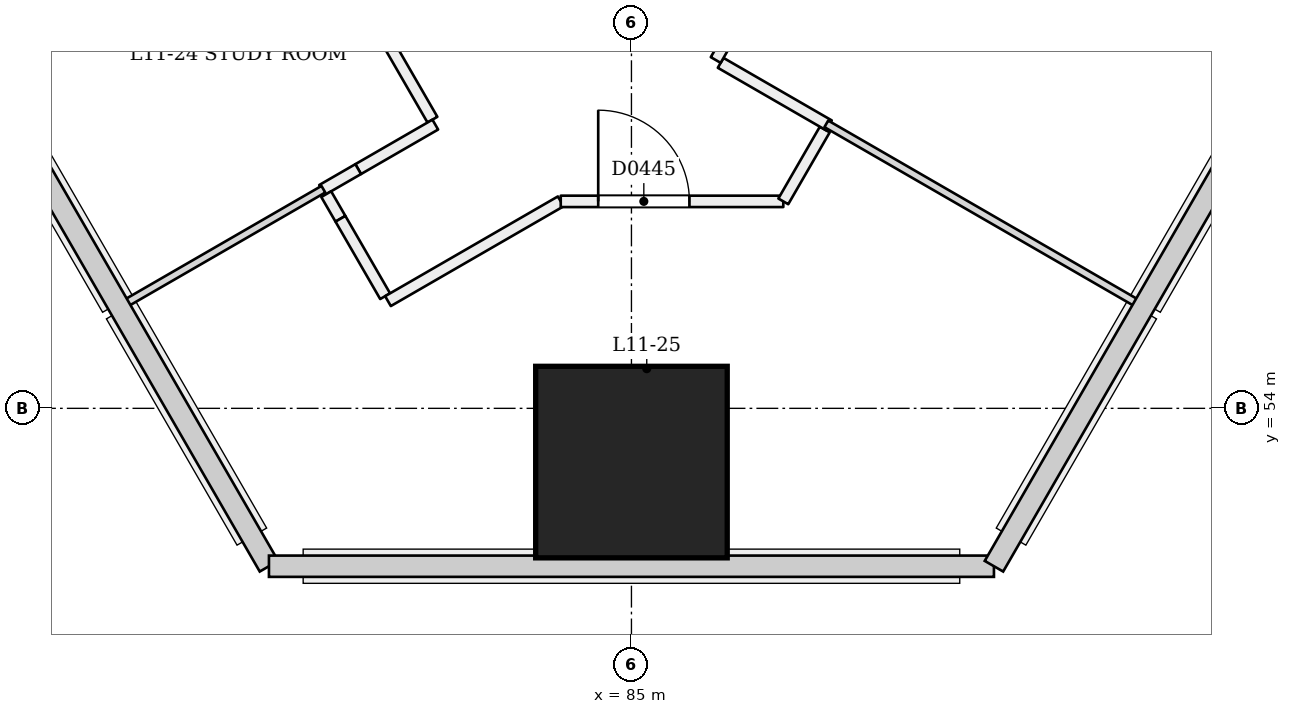
"""IFC4 building model, lengths in metres.
Left out: names, types, materials, properties, quantities, classifications, styles, units other than length and angle.
Written with IfcOpenShell. Run it as: python <this file> out.ifc"""

import sys

from ifc_helpers import new_model, si_unit, direction, frame, frame_2d, origin, origin_2d, place, context, subcontext, project, spatial, rectangle, extrude, element, fill, save


model = new_model("IFC4")
c1 = context("Model", 3, precision=1e-05, world=origin(), true_north=direction((0.0, 1.0)))
c2 = subcontext(c1, "Body", "Model", "MODEL_VIEW")
j1 = project(units=[si_unit("LENGTHUNIT", "METRE"), si_unit("PLANEANGLEUNIT", "RADIAN")], contexts=[c1])
p1 = place(None, origin())
s1 = spatial("IfcSite", under=j1, at=p1, CompositionType="ELEMENT")
p2 = place(p1, origin())
s2 = spatial("IfcBuilding", under=s1, at=p2, CompositionType="ELEMENT")
p3 = place(p2, frame((0.0, 0.0, 48.6)))
s3 = spatial("IfcBuildingStorey", under=s2, at=p3, CompositionType="ELEMENT", Elevation=48.6)
p4 = place(p3, frame((85.0, 53.223, 0.0), z_axis=(0.0, 0.058360852261, 0.998295552892), x_axis=(-1.0, 0.0, 0.0)))
e1 = element("IfcColumn", 1, at=p4, inside=s3, PredefinedType="COLUMN", context=c2, shape_type="SweptSolid", body=[
    extrude(rectangle(XDim=2.52, YDim=2.52, at=origin_2d()), origin(), (0.0, 0.0, 1.0), 3.606),
])
p5 = place(p3, frame((81.788, 58.826, 0.0), z_axis=(0.0, 0.0, 1.0), x_axis=(0.500030943131, -0.866007538022, 0.0)))
e2 = element("IfcWall", 2, at=p5, inside=s3, PredefinedType="PARTITIONING", context=c2, shape_type="SweptSolid", body=[
    extrude(rectangle(XDim=1.188, YDim=0.15, at=frame_2d((0.594, 0.0))), origin(), (0.0, 0.0, 1.0), 3.1),
])
p6 = place(p3, frame((82.419, 57.733, 0.0), z_axis=(0.0, 0.0, 1.0), x_axis=(-0.866053660865, -0.499951054106, 0.0)))
e3 = element("IfcWall", 3, at=p6, inside=s3, PredefinedType="PARTITIONING", context=c2, shape_type="SweptSolid", body=[
    extrude(rectangle(XDim=1.171, YDim=0.15, at=frame_2d((0.585, 0.0))), origin(), (0.0, 0.0, 1.0), 3.1),
])
p7 = place(p3, frame((81.405, 57.147, 0.0), z_axis=(0.0, 0.0, 1.0), x_axis=(-0.865963477364, -0.500107244371, 0.0)))
e4 = element("IfcWall", 4, at=p7, inside=s3, PredefinedType="PARTITIONING", context=c2, shape_type="SweptSolid", body=[
    extrude(rectangle(XDim=0.549, YDim=0.15, at=frame_2d((0.275, 0.0))), origin(), (0.0, 0.0, 1.0), 2.6),
])
p8 = place(p3, frame((80.984, 56.818, 0.0), z_axis=(0.0, 0.0, 1.0), x_axis=(0.500212318761, -0.865902786784, 0.0)))
e5 = element("IfcWall", 5, at=p8, inside=s3, PredefinedType="PARTITIONING", context=c2, shape_type="SweptSolid", body=[
    extrude(rectangle(XDim=0.374, YDim=0.15, at=frame_2d((0.187, 0.0))), origin(), (0.0, 0.0, 1.0), 2.6),
])
p9 = place(p3, frame((81.171, 56.494, 0.0), z_axis=(0.0, 0.0, 1.0), x_axis=(0.499890179513, -0.866088799389, 0.0)))
e6 = element("IfcWall", 6, at=p9, inside=s3, PredefinedType="PARTITIONING", context=c2, shape_type="SweptSolid", body=[
    extrude(rectangle(XDim=1.176, YDim=0.15, at=frame_2d((0.588, 0.0))), origin(), (0.0, 0.0, 1.0), 3.1),
])
p10 = place(p3, frame((81.797, 55.411, 0.0), z_axis=(0.0, 0.0, 1.0), x_axis=(0.866030680601, 0.499990860175, 0.0)))
e7 = element("IfcWall", 7, at=p10, inside=s3, PredefinedType="PARTITIONING", context=c2, shape_type="SweptSolid", body=[
    extrude(rectangle(XDim=2.625, YDim=0.15, at=frame_2d((1.312, 0.0))), origin(), (0.0, 0.0, 1.0), 2.6),
])
p11 = place(p3, frame((84.07, 56.723, 0.0), z_axis=(0.0, 0.0, 1.0), x_axis=(1.0, 0.0, 0.0)))
e8 = element("IfcWall", 8, at=p11, inside=s3, PredefinedType="PARTITIONING", context=c2, shape_type="SweptSolid", body=[
    extrude(rectangle(XDim=2.928, YDim=0.15, at=frame_2d((1.464, 0.0))), origin(), (0.0, 0.0, 1.0), 3.1),
])
p12 = place(p11, frame((0.493, 0.0, 0.0)))
e9 = element("IfcOpeningElement", 9, at=p12, cuts=e8, PredefinedType="OPENING", context=c2, shape_type="SweptSolid", body=[
    extrude(rectangle(XDim=1.2, YDim=2.1, at=frame_2d((0.6, 1.05))), frame((0.0, 0.085, 0.0), z_axis=(0.0, -1.0, 0.0), x_axis=(1.0, 0.0, 0.0)), (0.0, 0.0, 1.0), 0.171),
])
p13 = place(p3, frame((86.998, 56.723, 0.0), z_axis=(0.0, 0.0, 1.0), x_axis=(0.500012937857, 0.86601793398, 0.0)))
e10 = element("IfcWall", 10, at=p13, inside=s3, PredefinedType="PARTITIONING", context=c2, shape_type="SweptSolid", body=[
    extrude(rectangle(XDim=1.091, YDim=0.15, at=frame_2d((0.546, 0.0))), origin(), (0.0, 0.0, 1.0), 3.1),
])
p14 = place(p3, frame((87.598, 57.723, 0.0), z_axis=(0.0, 0.0, 1.0), x_axis=(-0.866015045157, 0.50001794124, 0.0)))
e11 = element("IfcWall", 11, at=p14, inside=s3, PredefinedType="PARTITIONING", context=c2, shape_type="SweptSolid", body=[
    extrude(rectangle(XDim=1.645, YDim=0.15, at=frame_2d((0.823, 0.0))), origin(), (0.0, 0.0, 1.0), 3.1),
])
p15 = place(p3, frame((86.109, 58.583, 0.0), z_axis=(0.0, 0.0, 1.0), x_axis=(0.499999734377, 0.866025557142, 0.0)))
e12 = element("IfcWall", 12, at=p15, inside=s3, PredefinedType="PARTITIONING", context=c2, shape_type="SweptSolid", body=[
    extrude(rectangle(XDim=39.938, YDim=0.15, at=frame_2d((19.969, 0.0))), origin(), (0.0, 0.0, 1.0), 2.7),
])
p16 = place(p15, frame((3.619, 0.0, 0.0)))
e13 = element("IfcOpeningElement", 13, at=p16, cuts=e12, PredefinedType="OPENING", context=c2, shape_type="SweptSolid", body=[
    extrude(rectangle(XDim=1.2, YDim=2.1, at=frame_2d((0.6, 1.05))), frame((0.0, 0.085, 0.0), z_axis=(0.0, -1.0, 0.0), x_axis=(1.0, 0.0, 0.0)), (0.0, 0.0, 1.0), 0.171),
])
p17 = place(p15, frame((11.217, 0.0, 0.0)))
e14 = element("IfcOpeningElement", 14, at=p17, cuts=e12, PredefinedType="OPENING", context=c2, shape_type="SweptSolid", body=[
    extrude(rectangle(XDim=1.0, YDim=2.1, at=frame_2d((0.5, 1.05))), frame((0.0, 0.085, 0.0), z_axis=(0.0, -1.0, 0.0), x_axis=(1.0, 0.0, 0.0)), (0.0, 0.0, 1.0), 0.171),
])
p18 = place(p15, frame((13.658, 0.0, 0.0)))
e15 = element("IfcOpeningElement", 15, at=p18, cuts=e12, PredefinedType="OPENING", context=c2, shape_type="SweptSolid", body=[
    extrude(rectangle(XDim=1.0, YDim=2.1, at=frame_2d((0.5, 1.05))), frame((0.0, 0.085, 0.0), z_axis=(0.0, -1.0, 0.0), x_axis=(1.0, 0.0, 0.0)), (0.0, 0.0, 1.0), 0.171),
])
p19 = place(p15, frame((20.217, 0.0, 0.0)))
e16 = element("IfcOpeningElement", 16, at=p19, cuts=e12, PredefinedType="OPENING", context=c2, shape_type="SweptSolid", body=[
    extrude(rectangle(XDim=1.0, YDim=2.1, at=frame_2d((0.5, 1.05))), frame((0.0, 0.085, 0.0), z_axis=(0.0, -1.0, 0.0), x_axis=(1.0, 0.0, 0.0)), (0.0, 0.0, 1.0), 0.171),
])
p20 = place(p15, frame((22.658, 0.0, 0.0)))
e17 = element("IfcOpeningElement", 17, at=p20, cuts=e12, PredefinedType="OPENING", context=c2, shape_type="SweptSolid", body=[
    extrude(rectangle(XDim=1.0, YDim=2.1, at=frame_2d((0.5, 1.05))), frame((0.0, 0.085, 0.0), z_axis=(0.0, -1.0, 0.0), x_axis=(1.0, 0.0, 0.0)), (0.0, 0.0, 1.0), 0.171),
])
p21 = place(p15, frame((29.217, 0.0, 0.0)))
e18 = element("IfcOpeningElement", 18, at=p21, cuts=e12, PredefinedType="OPENING", context=c2, shape_type="SweptSolid", body=[
    extrude(rectangle(XDim=1.0, YDim=2.1, at=frame_2d((0.5, 1.05))), frame((0.0, 0.085, 0.0), z_axis=(0.0, -1.0, 0.0), x_axis=(1.0, 0.0, 0.0)), (0.0, 0.0, 1.0), 0.171),
])
p22 = place(p15, frame((31.658, 0.0, 0.0)))
e19 = element("IfcOpeningElement", 19, at=p22, cuts=e12, PredefinedType="OPENING", context=c2, shape_type="SweptSolid", body=[
    extrude(rectangle(XDim=1.0, YDim=2.1, at=frame_2d((0.5, 1.05))), frame((0.0, 0.085, 0.0), z_axis=(0.0, -1.0, 0.0), x_axis=(1.0, 0.0, 0.0)), (0.0, 0.0, 1.0), 0.171),
])
p23 = place(p15, frame((38.217, 0.0, 0.0)))
e20 = element("IfcOpeningElement", 20, at=p23, cuts=e12, PredefinedType="OPENING", context=c2, shape_type="SweptSolid", body=[
    extrude(rectangle(XDim=1.0, YDim=2.1, at=frame_2d((0.5, 1.05))), frame((0.0, 0.085, 0.0), z_axis=(0.0, -1.0, 0.0), x_axis=(1.0, 0.0, 0.0)), (0.0, 0.0, 1.0), 0.171),
])
p24 = place(p3, frame((78.331, 55.373, 0.0), z_axis=(0.0, 0.0, 1.0), x_axis=(0.866030774596, 0.499990697366, 0.0)))
e21 = element("IfcWall", 21, at=p24, inside=s3, PredefinedType="PARTITIONING", context=c2, shape_type="SweptSolid", body=[
    extrude(rectangle(XDim=3.02, YDim=0.1, at=frame_2d((1.51, 0.0))), origin(), (0.0, 0.0, 1.0), 2.6),
])
p25 = place(p3, frame((91.669, 55.373, 0.0), z_axis=(0.0, 0.0, 1.0), x_axis=(-0.866015756104, 0.5000167099, 0.0)))
e22 = element("IfcWall", 22, at=p25, inside=s3, PredefinedType="PARTITIONING", context=c2, shape_type="SweptSolid", body=[
    extrude(rectangle(XDim=4.74, YDim=0.1, at=frame_2d((2.37, 0.0))), origin(), (0.0, 0.0, 1.0), 2.6),
])
p26 = place(p12, origin())
e23 = element("IfcDoor", 23, at=p26, inside=s3, OperationType="SINGLE_SWING_LEFT", PredefinedType="NOTDEFINED", context=c2, shape_type="SweptSolid", body=[
    extrude(rectangle(XDim=1.2, YDim=2.1, at=frame_2d((0.6, 1.05))), frame((0.0, 0.025, 0.0), z_axis=(0.0, -1.0, 0.0), x_axis=(1.0, 0.0, 0.0)), (0.0, 0.0, 1.0), 0.05),
])
fill(e9, e23)
save(model, sys.argv[1])
